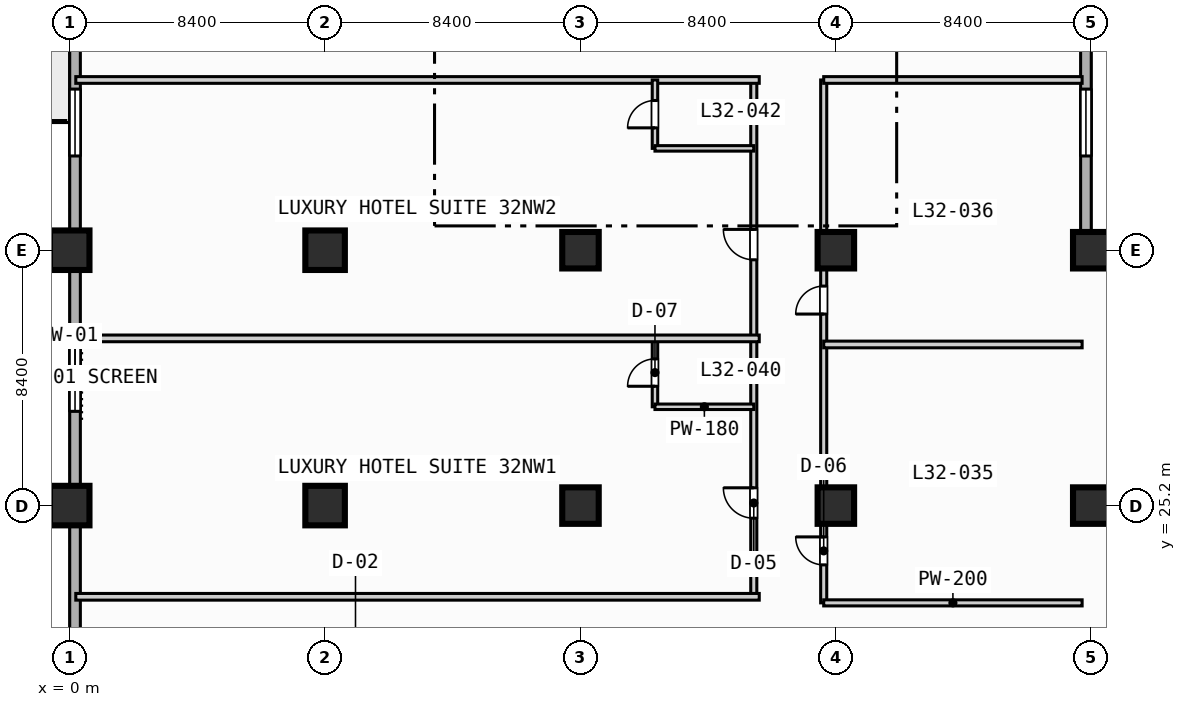
"""IFC4 building model, lengths in metres.
Left out: names, types, materials, properties, quantities, classifications, styles, units other than length and angle.
Written with IfcOpenShell. Run it as: python <this file> out.ifc"""

import sys

from ifc_helpers import new_model, si_unit, direction, frame, frame_2d, origin, origin_2d, place, context, subcontext, project, spatial, rectangle, extrude, element, fill, save


model = new_model("IFC4")
c1 = context("Model", 3, precision=1e-05, world=origin(), true_north=direction((0.0, 1.0)))
c2 = subcontext(c1, "Body", "Model", "MODEL_VIEW")
j1 = project(units=[si_unit("LENGTHUNIT", "METRE"), si_unit("PLANEANGLEUNIT", "RADIAN")], contexts=[c1])
p1 = place(None, origin())
s1 = spatial("IfcSite", under=j1, at=p1, CompositionType="ELEMENT")
p2 = place(p1, origin())
s2 = spatial("IfcBuilding", under=s1, at=p2, CompositionType="ELEMENT")
p3 = place(p2, frame((0.0, 0.0, 134.2)))
s3 = spatial("IfcBuildingStorey", under=s2, at=p3, CompositionType="ELEMENT", Elevation=134.2)
for number, where, z_axis, x_axis in (
    (1, (0.0, 25.2, 0.0), (0.0, 0.0, 1.0), (1.0, 0.0, 0.0)),
    (2, (0.0, 33.6, 0.0), (0.0, 0.0, 1.0), (1.0, 0.0, 0.0)),
    (3, (8.4, 25.2, 0.0), (0.0, 0.0, 1.0), (1.0, 0.0, 0.0)),
    (4, (8.4, 33.6, 0.0), (0.0, 0.0, 1.0), (1.0, 0.0, 0.0)),
):
    element("IfcColumn", number, at=place(p3, frame(where, z_axis=z_axis, x_axis=x_axis)), inside=s3, PredefinedType="COLUMN", context=c2, shape_type="SweptSolid", body=[
        extrude(rectangle(XDim=1.3, YDim=1.3, at=origin_2d()), origin(), (0.0, 0.0, 1.0), 3.8),
    ])
for number, where, z_axis, x_axis in (
    (5, (16.8, 25.2, 0.0), (0.0, 0.0, 1.0), (1.0, 0.0, 0.0)),
    (6, (16.8, 33.6, 0.0), (0.0, 0.0, 1.0), (1.0, 0.0, 0.0)),
    (7, (25.2, 25.2, 0.0), (0.0, 0.0, 1.0), (1.0, 0.0, 0.0)),
    (8, (25.2, 33.6, 0.0), (0.0, 0.0, 1.0), (1.0, 0.0, 0.0)),
    (9, (33.6, 25.2, 0.0), (0.0, 0.0, 1.0), (1.0, 0.0, 0.0)),
    (10, (33.6, 33.6, 0.0), (0.0, 0.0, 1.0), (1.0, 0.0, 0.0)),
):
    element("IfcColumn", number, at=place(p3, frame(where, z_axis=z_axis, x_axis=x_axis)), inside=s3, PredefinedType="COLUMN", context=c2, shape_type="SweptSolid", body=[
        extrude(rectangle(XDim=1.2, YDim=1.2, at=origin_2d()), origin(), (0.0, 0.0, 1.0), 3.8),
    ])
p4 = place(p3, frame((0.175, 3.175, 0.0), z_axis=(0.0, 0.0, 1.0), x_axis=(0.0, 1.0, 0.0)))
e11 = element("IfcWall", 11, at=p4, inside=s3, PredefinedType="STANDARD", context=c2, shape_type="SweptSolid", body=[
    extrude(rectangle(XDim=86.05, YDim=0.35, at=frame_2d((43.025, 0.0))), origin(), (0.0, 0.0, 1.0), 3.55),
])
p5 = place(p4, frame((42.325, 0.0, 0.0)))
e12 = element("IfcOpeningElement", 12, at=p5, cuts=e11, PredefinedType="OPENING", context=c2, shape_type="SweptSolid", body=[
    extrude(rectangle(XDim=1.4, YDim=2.2, at=frame_2d((0.7, 1.1))), frame((0.0, 0.185, 0.0), z_axis=(0.0, -1.0, 0.0), x_axis=(1.0, 0.0, 0.0)), (0.0, 0.0, 1.0), 0.37),
])
p6 = place(p4, frame((25.125, 0.0, 0.85)))
e13 = element("IfcOpeningElement", 13, at=p6, cuts=e11, PredefinedType="OPENING", context=c2, shape_type="SweptSolid", body=[
    extrude(rectangle(XDim=2.2, YDim=1.8, at=frame_2d((1.1, 0.9))), frame((0.0, 0.185, 0.0), z_axis=(0.0, -1.0, 0.0), x_axis=(1.0, 0.0, 0.0)), (0.0, 0.0, 1.0), 0.37),
])
p7 = place(p4, frame((33.525, 0.0, 0.85)))
e14 = element("IfcOpeningElement", 14, at=p7, cuts=e11, PredefinedType="OPENING", context=c2, shape_type="SweptSolid", body=[
    extrude(rectangle(XDim=2.2, YDim=1.8, at=frame_2d((1.1, 0.9))), frame((0.0, 0.185, 0.0), z_axis=(0.0, -1.0, 0.0), x_axis=(1.0, 0.0, 0.0)), (0.0, 0.0, 1.0), 0.37),
])
p8 = place(p3, frame((33.425, 89.225, 0.0), z_axis=(0.0, 0.0, 1.0), x_axis=(0.0, -1.0, 0.0)))
e15 = element("IfcWall", 15, at=p8, inside=s3, PredefinedType="STANDARD", context=c2, shape_type="SweptSolid", body=[
    extrude(rectangle(XDim=55.8, YDim=0.35, at=frame_2d((27.9, 0.0))), origin(), (0.0, 0.0, 1.0), 3.55),
])
p9 = place(p8, frame((50.325, 0.0, 0.85)))
e16 = element("IfcOpeningElement", 16, at=p9, cuts=e15, PredefinedType="OPENING", context=c2, shape_type="SweptSolid", body=[
    extrude(rectangle(XDim=2.2, YDim=1.8, at=frame_2d((1.1, 0.9))), frame((0.0, 0.185, 0.0), z_axis=(0.0, -1.0, 0.0), x_axis=(1.0, 0.0, 0.0)), (0.0, 0.0, 1.0), 0.37),
])
p10 = place(p8, frame((33.525, 0.0, 0.85)))
e17 = element("IfcOpeningElement", 17, at=p10, cuts=e15, PredefinedType="OPENING", context=c2, shape_type="SweptSolid", body=[
    extrude(rectangle(XDim=2.2, YDim=1.8, at=frame_2d((1.1, 0.9))), frame((0.0, 0.185, 0.0), z_axis=(0.0, -1.0, 0.0), x_axis=(1.0, 0.0, 0.0)), (0.0, 0.0, 1.0), 0.37),
])
p11 = place(p8, frame((25.125, 0.0, 0.85)))
e18 = element("IfcOpeningElement", 18, at=p11, cuts=e15, PredefinedType="OPENING", context=c2, shape_type="SweptSolid", body=[
    extrude(rectangle(XDim=2.2, YDim=1.8, at=frame_2d((1.1, 0.9))), frame((0.0, 0.185, 0.0), z_axis=(0.0, -1.0, 0.0), x_axis=(1.0, 0.0, 0.0)), (0.0, 0.0, 1.0), 0.37),
])
p12 = place(p8, frame((16.725, 0.0, 0.85)))
e19 = element("IfcOpeningElement", 19, at=p12, cuts=e15, PredefinedType="OPENING", context=c2, shape_type="SweptSolid", body=[
    extrude(rectangle(XDim=2.2, YDim=1.8, at=frame_2d((1.1, 0.9))), frame((0.0, 0.185, 0.0), z_axis=(0.0, -1.0, 0.0), x_axis=(1.0, 0.0, 0.0)), (0.0, 0.0, 1.0), 0.37),
])
p13 = place(p8, frame((8.325, 0.0, 0.85)))
e20 = element("IfcOpeningElement", 20, at=p13, cuts=e15, PredefinedType="OPENING", context=c2, shape_type="SweptSolid", body=[
    extrude(rectangle(XDim=2.2, YDim=1.8, at=frame_2d((1.1, 0.9))), frame((0.0, 0.185, 0.0), z_axis=(0.0, -1.0, 0.0), x_axis=(1.0, 0.0, 0.0)), (0.0, 0.0, 1.0), 0.37),
])
p14 = place(p3, frame((33.425, 33.425, 0.0), z_axis=(0.0, 0.0, 1.0), x_axis=(1.0, 0.0, 0.0)))
e21 = element("IfcWall", 21, at=p14, inside=s3, PredefinedType="STANDARD", context=c2, shape_type="SweptSolid", body=[
    extrude(rectangle(XDim=39.0, YDim=0.35, at=frame_2d((19.5, 0.0))), origin(), (0.0, 0.0, 1.0), 3.55),
])
p15 = place(p14, frame((12.075, 0.0, 0.0)))
e22 = element("IfcOpeningElement", 22, at=p15, cuts=e21, PredefinedType="OPENING", context=c2, shape_type="SweptSolid", body=[
    extrude(rectangle(XDim=1.4, YDim=2.2, at=frame_2d((0.7, 1.1))), frame((0.0, 0.185, 0.0), z_axis=(0.0, -1.0, 0.0), x_axis=(1.0, 0.0, 0.0)), (0.0, 0.0, 1.0), 0.37),
])
p16 = place(p3, frame((24.8, 22.0, 0.0), z_axis=(0.0, 0.0, 1.0), x_axis=(0.0, 1.0, 0.0)))
e23 = element("IfcWall", 23, at=p16, inside=s3, PredefinedType="PARTITIONING", context=c2, shape_type="SweptSolid", body=[
    extrude(rectangle(XDim=17.2, YDim=0.2, at=frame_2d((8.6, 0.0))), origin(), (0.0, 0.0, 1.0), 3.55),
])
p17 = place(p16, frame((1.25, 0.0, 0.0)))
e24 = element("IfcOpeningElement", 24, at=p17, cuts=e23, PredefinedType="OPENING", context=c2, shape_type="SweptSolid", body=[
    extrude(rectangle(XDim=0.92, YDim=2.1, at=frame_2d((0.46, 1.05))), frame((0.0, 0.11, 0.0), z_axis=(0.0, -1.0, 0.0), x_axis=(1.0, 0.0, 0.0)), (0.0, 0.0, 1.0), 0.22),
])
p18 = place(p16, frame((9.5, 0.0, 0.0)))
e25 = element("IfcOpeningElement", 25, at=p18, cuts=e23, PredefinedType="OPENING", context=c2, shape_type="SweptSolid", body=[
    extrude(rectangle(XDim=0.92, YDim=2.1, at=frame_2d((0.46, 1.05))), frame((0.0, 0.11, 0.0), z_axis=(0.0, -1.0, 0.0), x_axis=(1.0, 0.0, 0.0)), (0.0, 0.0, 1.0), 0.22),
])
p19 = place(p3, frame((24.8, 22.0, 0.0), z_axis=(0.0, 0.0, 1.0), x_axis=(1.0, 0.0, 0.0)))
e26 = element("IfcWall", 26, at=p19, inside=s3, PredefinedType="PARTITIONING", context=c2, shape_type="SweptSolid", body=[
    extrude(rectangle(XDim=8.5, YDim=0.2, at=frame_2d((4.25, 0.0))), origin(), (0.0, 0.0, 1.0), 3.55),
])
for number, where, z_axis, x_axis in (
    (27, (24.8, 30.5, 0.0), (0.0, 0.0, 1.0), (1.0, 0.0, 0.0)),
    (28, (24.8, 39.2, 0.0), (0.0, 0.0, 1.0), (1.0, 0.0, 0.0)),
):
    element("IfcWall", number, at=place(p3, frame(where, z_axis=z_axis, x_axis=x_axis)), inside=s3, PredefinedType="PARTITIONING", context=c2, shape_type="SweptSolid", body=[
        extrude(rectangle(XDim=8.5, YDim=0.22, at=frame_2d((4.25, 0.0))), origin(), (0.0, 0.0, 1.0), 3.55),
    ])
p20 = place(p3, frame((22.5, 22.2, 0.0), z_axis=(0.0, 0.0, 1.0), x_axis=(0.0, 1.0, 0.0)))
e29 = element("IfcWall", 29, at=p20, inside=s3, PredefinedType="PARTITIONING", context=c2, shape_type="SweptSolid", body=[
    extrude(rectangle(XDim=17.0, YDim=0.2, at=frame_2d((8.5, 0.0))), origin(), (0.0, 0.0, 1.0), 3.55),
])
p21 = place(p20, frame((2.585, 0.0, 0.0)))
e30 = element("IfcOpeningElement", 30, at=p21, cuts=e29, PredefinedType="OPENING", context=c2, shape_type="SweptSolid", body=[
    extrude(rectangle(XDim=1.0, YDim=2.15, at=frame_2d((0.5, 1.075))), frame((0.0, 0.11, 0.0), z_axis=(0.0, -1.0, 0.0), x_axis=(1.0, 0.0, 0.0)), (0.0, 0.0, 1.0), 0.22),
])
p22 = place(p20, frame((11.085, 0.0, 0.0)))
e31 = element("IfcOpeningElement", 31, at=p22, cuts=e29, PredefinedType="OPENING", context=c2, shape_type="SweptSolid", body=[
    extrude(rectangle(XDim=1.0, YDim=2.15, at=frame_2d((0.5, 1.075))), frame((0.0, 0.11, 0.0), z_axis=(0.0, -1.0, 0.0), x_axis=(1.0, 0.0, 0.0)), (0.0, 0.0, 1.0), 0.22),
])
p23 = place(p3, frame((0.2, 22.2, 0.0), z_axis=(0.0, 0.0, 1.0), x_axis=(1.0, 0.0, 0.0)))
e32 = element("IfcWall", 32, at=p23, inside=s3, PredefinedType="PARTITIONING", context=c2, shape_type="SweptSolid", body=[
    extrude(rectangle(XDim=22.48, YDim=0.22, at=frame_2d((11.24, 0.0))), origin(), (0.0, 0.0, 1.0), 3.55),
])
p24 = place(p3, frame((19.25, 28.45, 0.0), z_axis=(0.0, 0.0, 1.0), x_axis=(0.0, 1.0, 0.0)))
e33 = element("IfcWall", 33, at=p24, inside=s3, PredefinedType="PLUMBINGWALL", context=c2, shape_type="SweptSolid", body=[
    extrude(rectangle(XDim=2.25, YDim=0.18, at=frame_2d((1.125, 0.0))), origin(), (0.0, 0.0, 1.0), 3.55),
])
p25 = place(p24, frame((0.675, 0.0, 0.0)))
e34 = element("IfcOpeningElement", 34, at=p25, cuts=e33, PredefinedType="OPENING", context=c2, shape_type="SweptSolid", body=[
    extrude(rectangle(XDim=0.9, YDim=2.1, at=frame_2d((0.45, 1.05))), frame((0.0, 0.1, 0.0), z_axis=(0.0, -1.0, 0.0), x_axis=(1.0, 0.0, 0.0)), (0.0, 0.0, 1.0), 0.2),
])
p26 = place(p3, frame((19.25, 28.45, 0.0), z_axis=(0.0, 0.0, 1.0), x_axis=(1.0, 0.0, 0.0)))
e35 = element("IfcWall", 35, at=p26, inside=s3, PredefinedType="PLUMBINGWALL", context=c2, shape_type="SweptSolid", body=[
    extrude(rectangle(XDim=3.25, YDim=0.18, at=frame_2d((1.625, 0.0))), origin(), (0.0, 0.0, 1.0), 3.55),
])
for number, where, z_axis, x_axis in (
    (36, (0.2, 30.7, 0.0), (0.0, 0.0, 1.0), (1.0, 0.0, 0.0)),
    (37, (0.2, 39.2, 0.0), (0.0, 0.0, 1.0), (1.0, 0.0, 0.0)),
):
    element("IfcWall", number, at=place(p3, frame(where, z_axis=z_axis, x_axis=x_axis)), inside=s3, PredefinedType="PARTITIONING", context=c2, shape_type="SweptSolid", body=[
        extrude(rectangle(XDim=22.48, YDim=0.22, at=frame_2d((11.24, 0.0))), origin(), (0.0, 0.0, 1.0), 3.55),
    ])
p27 = place(p3, frame((19.25, 36.95, 0.0), z_axis=(0.0, 0.0, 1.0), x_axis=(0.0, 1.0, 0.0)))
e38 = element("IfcWall", 38, at=p27, inside=s3, PredefinedType="PLUMBINGWALL", context=c2, shape_type="SweptSolid", body=[
    extrude(rectangle(XDim=2.25, YDim=0.18, at=frame_2d((1.125, 0.0))), origin(), (0.0, 0.0, 1.0), 3.55),
])
p28 = place(p27, frame((0.675, 0.0, 0.0)))
e39 = element("IfcOpeningElement", 39, at=p28, cuts=e38, PredefinedType="OPENING", context=c2, shape_type="SweptSolid", body=[
    extrude(rectangle(XDim=0.9, YDim=2.1, at=frame_2d((0.45, 1.05))), frame((0.0, 0.1, 0.0), z_axis=(0.0, -1.0, 0.0), x_axis=(1.0, 0.0, 0.0)), (0.0, 0.0, 1.0), 0.2),
])
p29 = place(p3, frame((19.25, 36.95, 0.0), z_axis=(0.0, 0.0, 1.0), x_axis=(1.0, 0.0, 0.0)))
e40 = element("IfcWall", 40, at=p29, inside=s3, PredefinedType="PLUMBINGWALL", context=c2, shape_type="SweptSolid", body=[
    extrude(rectangle(XDim=3.25, YDim=0.18, at=frame_2d((1.625, 0.0))), origin(), (0.0, 0.0, 1.0), 3.55),
])
p30 = place(p6, origin())
e41 = element("IfcWindow", 41, at=p30, inside=s3, PartitioningType="SINGLE_PANEL", PredefinedType="WINDOW", context=c2, shape_type="SweptSolid", body=[
    extrude(rectangle(XDim=2.2, YDim=1.8, at=frame_2d((1.1, 0.9))), frame((0.0, 0.03, 0.0), z_axis=(0.0, -1.0, 0.0), x_axis=(1.0, 0.0, 0.0)), (0.0, 0.0, 1.0), 0.06),
])
fill(e13, e41)
p31 = place(p7, origin())
e42 = element("IfcWindow", 42, at=p31, inside=s3, PartitioningType="SINGLE_PANEL", PredefinedType="WINDOW", context=c2, shape_type="SweptSolid", body=[
    extrude(rectangle(XDim=2.2, YDim=1.8, at=frame_2d((1.1, 0.9))), frame((0.0, 0.03, 0.0), z_axis=(0.0, -1.0, 0.0), x_axis=(1.0, 0.0, 0.0)), (0.0, 0.0, 1.0), 0.06),
])
fill(e14, e42)
p32 = place(p9, origin())
e43 = element("IfcWindow", 43, at=p32, inside=s3, PartitioningType="SINGLE_PANEL", PredefinedType="WINDOW", context=c2, shape_type="SweptSolid", body=[
    extrude(rectangle(XDim=2.2, YDim=1.8, at=frame_2d((1.1, 0.9))), frame((0.0, 0.03, 0.0), z_axis=(0.0, -1.0, 0.0), x_axis=(1.0, 0.0, 0.0)), (0.0, 0.0, 1.0), 0.06),
])
fill(e16, e43)
p33 = place(p17, origin())
e44 = element("IfcDoor", 44, at=p33, inside=s3, OperationType="SINGLE_SWING_RIGHT", PredefinedType="DOOR", context=c2, shape_type="SweptSolid", body=[
    extrude(rectangle(XDim=0.92, YDim=2.1, at=frame_2d((0.46, 1.05))), frame((0.0, 0.025, 0.0), z_axis=(0.0, -1.0, 0.0), x_axis=(1.0, 0.0, 0.0)), (0.0, 0.0, 1.0), 0.05),
])
fill(e24, e44)
p34 = place(p18, origin())
e45 = element("IfcDoor", 45, at=p34, inside=s3, OperationType="SINGLE_SWING_LEFT", PredefinedType="DOOR", context=c2, shape_type="SweptSolid", body=[
    extrude(rectangle(XDim=0.92, YDim=2.1, at=frame_2d((0.46, 1.05))), frame((0.0, 0.025, 0.0), z_axis=(0.0, -1.0, 0.0), x_axis=(1.0, 0.0, 0.0)), (0.0, 0.0, 1.0), 0.05),
])
fill(e25, e45)
p35 = place(p21, origin())
e46 = element("IfcDoor", 46, at=p35, inside=s3, OperationType="SINGLE_SWING_RIGHT", PredefinedType="DOOR", context=c2, shape_type="SweptSolid", body=[
    extrude(rectangle(XDim=1.0, YDim=2.15, at=frame_2d((0.5, 1.075))), frame((0.0, 0.025, 0.0), z_axis=(0.0, -1.0, 0.0), x_axis=(1.0, 0.0, 0.0)), (0.0, 0.0, 1.0), 0.05),
])
fill(e30, e46)
p36 = place(p22, origin())
e47 = element("IfcDoor", 47, at=p36, inside=s3, OperationType="SINGLE_SWING_RIGHT", PredefinedType="DOOR", context=c2, shape_type="SweptSolid", body=[
    extrude(rectangle(XDim=1.0, YDim=2.15, at=frame_2d((0.5, 1.075))), frame((0.0, 0.025, 0.0), z_axis=(0.0, -1.0, 0.0), x_axis=(1.0, 0.0, 0.0)), (0.0, 0.0, 1.0), 0.05),
])
fill(e31, e47)
p37 = place(p25, origin())
e48 = element("IfcDoor", 48, at=p37, inside=s3, OperationType="SINGLE_SWING_LEFT", PredefinedType="DOOR", context=c2, shape_type="SweptSolid", body=[
    extrude(rectangle(XDim=0.9, YDim=2.1, at=frame_2d((0.45, 1.05))), frame((0.0, 0.025, 0.0), z_axis=(0.0, -1.0, 0.0), x_axis=(1.0, 0.0, 0.0)), (0.0, 0.0, 1.0), 0.05),
])
fill(e34, e48)
p38 = place(p28, origin())
e49 = element("IfcDoor", 49, at=p38, inside=s3, OperationType="SINGLE_SWING_LEFT", PredefinedType="DOOR", context=c2, shape_type="SweptSolid", body=[
    extrude(rectangle(XDim=0.9, YDim=2.1, at=frame_2d((0.45, 1.05))), frame((0.0, 0.025, 0.0), z_axis=(0.0, -1.0, 0.0), x_axis=(1.0, 0.0, 0.0)), (0.0, 0.0, 1.0), 0.05),
])
fill(e39, e49)
save(model, sys.argv[1])
